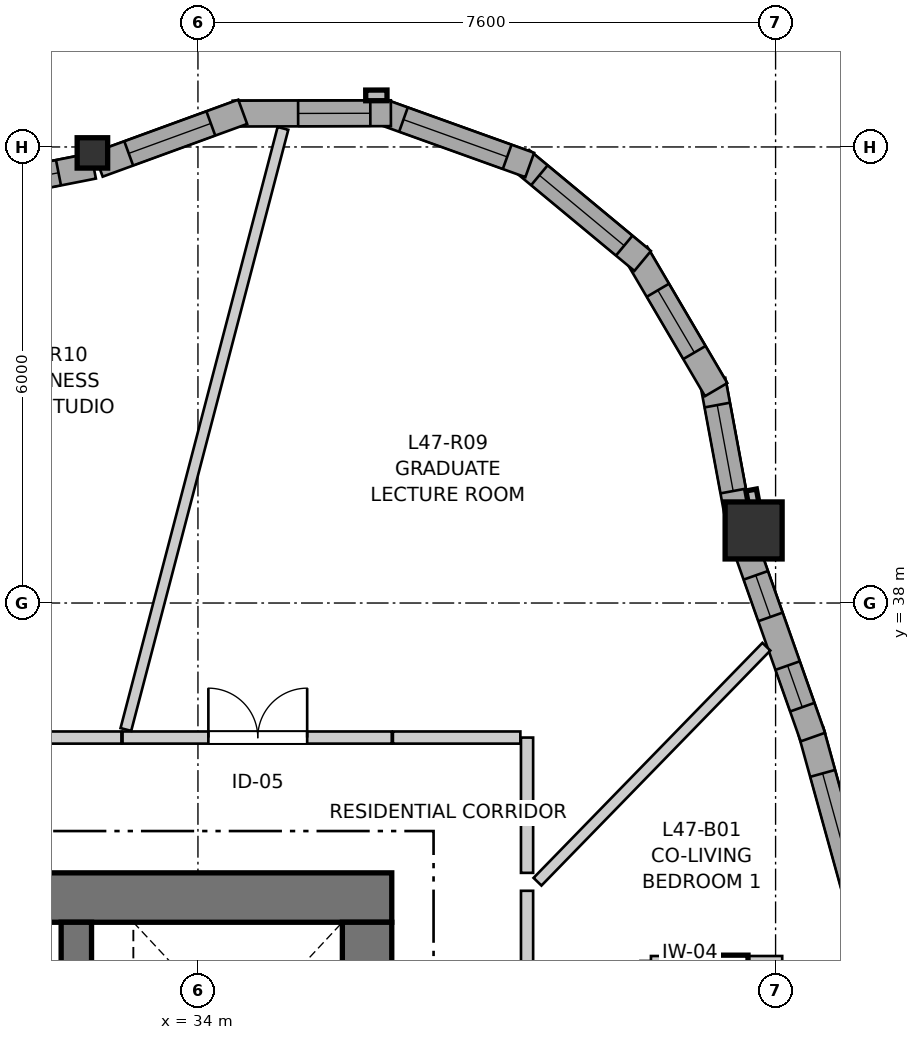
"""IFC4 building model, lengths in metres.
Left out: names, types, materials, properties, quantities, classifications, styles, units other than length and angle.
Written with IfcOpenShell. Run it as: python <this file> out.ifc"""

import sys

from ifc_helpers import new_model, si_unit, direction, frame, frame_2d, origin, origin_2d, place, context, subcontext, project, spatial, rectangle, i_section, extrude, source, transform, mapped, element, fill, save


model = new_model("IFC4")
c1 = context("Model", 3, precision=1e-05, world=origin(), true_north=direction((0.0, 1.0)))
c2 = subcontext(c1, "Body", "Model", "MODEL_VIEW")
j1 = project(units=[si_unit("LENGTHUNIT", "METRE"), si_unit("PLANEANGLEUNIT", "RADIAN")], contexts=[c1])
p1 = place(None, origin())
s1 = spatial("IfcSite", under=j1, at=p1, CompositionType="ELEMENT")
p2 = place(p1, origin())
s2 = spatial("IfcBuilding", under=s1, at=p2, CompositionType="ELEMENT")
p3 = place(p2, frame((0.0, 0.0, 158.6)))
s3 = spatial("IfcBuildingStorey", under=s2, at=p3, CompositionType="ELEMENT", Elevation=158.6)
p4 = place(p3, frame((36.55, 34.125, 0.0), z_axis=(0.0, 0.0, 1.0), x_axis=(-1.0, 0.0, 0.0)))
e1 = element("IfcWall", 1, at=p4, inside=s3, PredefinedType="SHEAR", context=c2, shape_type="SweptSolid", body=[
    extrude(rectangle(XDim=12.4, YDim=0.65, at=frame_2d((6.2, 0.0))), origin(), (0.0, 0.0, 1.0), 2.95),
])
p5 = place(p3, frame((36.225, 18.2, 0.0), z_axis=(0.0, 0.0, 1.0), x_axis=(0.0, 1.0, 0.0)))
e2 = element("IfcWall", 2, at=p5, inside=s3, PredefinedType="SHEAR", context=c2, shape_type="SweptSolid", body=[
    extrude(rectangle(XDim=15.6, YDim=0.65, at=frame_2d((7.8, 0.0))), origin(), (0.0, 0.0, 1.0), 2.95),
])
p6 = place(p5, frame((4.25, 0.0, 0.0)))
e3 = element("IfcOpeningElement", 3, at=p6, cuts=e2, PredefinedType="OPENING", context=c2, shape_type="SweptSolid", body=[
    extrude(rectangle(XDim=1.1, YDim=2.15, at=frame_2d((0.55, 1.075))), frame((0.0, 0.335, 0.0), z_axis=(0.0, -1.0, 0.0), x_axis=(1.0, 0.0, 0.0)), (0.0, 0.0, 1.0), 0.67),
])
p7 = place(p5, frame((10.25, 0.0, 0.0)))
e4 = element("IfcOpeningElement", 4, at=p7, cuts=e2, PredefinedType="OPENING", context=c2, shape_type="SweptSolid", body=[
    extrude(rectangle(XDim=1.1, YDim=2.15, at=frame_2d((0.55, 1.075))), frame((0.0, 0.335, 0.0), z_axis=(0.0, -1.0, 0.0), x_axis=(1.0, 0.0, 0.0)), (0.0, 0.0, 1.0), 0.67),
])
p8 = place(p3, frame((32.4, 30.85, 0.0), z_axis=(0.0, 0.0, 1.0), x_axis=(0.0, 1.0, 0.0)))
e5 = element("IfcWall", 5, at=p8, inside=s3, PredefinedType="SHEAR", context=c2, shape_type="SweptSolid", body=[
    extrude(rectangle(XDim=2.95, YDim=0.4, at=frame_2d((1.475, 0.0))), origin(), (0.0, 0.0, 1.0), 2.95),
])
m1 = source(origin(), c2, "Body", "SweptSolid", [
    extrude(rectangle(XDim=0.75, YDim=0.75, at=origin_2d()), origin(), (0.0, 0.0, 1.0), 2.95),
])
p9 = place(p3, frame((41.311, 38.955, 0.0), z_axis=(0.0, 0.0, 1.0), x_axis=(1.0, 0.0, 0.0)))
e6 = element("IfcColumn", 6, at=p9, inside=s3, PredefinedType="COLUMN", context=c2, shape_type="MappedRepresentation", body=[
    mapped(m1, transform((0.0, 0.0, 0.0), x_axis=(1.0, 0.0, 0.0), y_axis=(0.0, 1.0, 0.0), z_axis=(0.0, 0.0, 1.0), scale=1.0)),
])
m2 = source(origin(), c2, "Body", "SweptSolid", [
    extrude(i_section(OverallWidth=0.401, OverallDepth=0.399, WebThickness=0.023, FlangeThickness=0.036, FilletRadius=0.015, at=origin_2d()), origin(), (0.0, 0.0, 1.0), 2.95),
])
p10 = place(p3, frame((32.611, 43.922, 0.0), z_axis=(0.0, 0.0, 1.0), x_axis=(1.0, 0.0, 0.0)))
e7 = element("IfcColumn", 7, at=p10, inside=s3, PredefinedType="PILASTER", context=c2, shape_type="MappedRepresentation", body=[
    mapped(m2, transform((0.0, 0.0, 0.0), x_axis=(1.0, 0.0, 0.0), y_axis=(0.0, 1.0, 0.0), z_axis=(0.0, 0.0, 1.0), scale=1.0)),
])
p11 = place(p3, frame((42.795, 33.674, 0.0), z_axis=(0.0, 0.0, 1.0), x_axis=(-0.266404970566, 0.963861188999, 0.0)))
e8 = element("IfcWall", 8, at=p11, inside=s3, PredefinedType="SOLIDWALL", context=c2, shape_type="SweptSolid", body=[
    extrude(rectangle(XDim=2.745, YDim=0.34, at=frame_2d((1.372, 0.0))), origin(), (0.0, 0.0, 1.0), 2.53),
])
p12 = place(p11, frame((0.562, 0.0, 0.82)))
e9 = element("IfcOpeningElement", 9, at=p12, cuts=e8, PredefinedType="OPENING", context=c2, shape_type="SweptSolid", body=[
    extrude(rectangle(XDim=1.6, YDim=1.35, at=frame_2d((0.8, 0.675))), frame((0.0, 0.18, 0.0), z_axis=(0.0, -1.0, 0.0), x_axis=(1.0, 0.0, 0.0)), (0.0, 0.0, 1.0), 0.36),
])
p13 = place(p3, frame((42.09, 36.236, 0.0), z_axis=(0.0, 0.0, 1.0), x_axis=(-0.332705243691, 0.943030869495, 0.0)))
e10 = element("IfcWall", 10, at=p13, inside=s3, PredefinedType="SOLIDWALL", context=c2, shape_type="SweptSolid", body=[
    extrude(rectangle(XDim=2.668, YDim=0.34, at=frame_2d((1.334, 0.0))), origin(), (0.0, 0.0, 1.0), 2.53),
])
p14 = place(p13, frame((0.417, 0.0, 0.82)))
e11 = element("IfcOpeningElement", 11, at=p14, cuts=e10, PredefinedType="OPENING", context=c2, shape_type="SweptSolid", body=[
    extrude(rectangle(XDim=0.58, YDim=1.35, at=frame_2d((0.29, 0.675))), frame((0.0, 0.18, 0.0), z_axis=(0.0, -1.0, 0.0), x_axis=(1.0, 0.0, 0.0)), (0.0, 0.0, 1.0), 0.36),
])
p15 = place(p13, frame((1.677, 0.0, 0.82)))
e12 = element("IfcOpeningElement", 12, at=p15, cuts=e10, PredefinedType="OPENING", context=c2, shape_type="SweptSolid", body=[
    extrude(rectangle(XDim=0.58, YDim=1.35, at=frame_2d((0.29, 0.675))), frame((0.0, 0.18, 0.0), z_axis=(0.0, -1.0, 0.0), x_axis=(1.0, 0.0, 0.0)), (0.0, 0.0, 1.0), 0.36),
])
p16 = place(p3, frame((41.115, 39.076, 0.0), z_axis=(0.0, 0.0, 1.0), x_axis=(-0.182320770307, 0.983239104549, 0.0)))
e13 = element("IfcWall", 13, at=p16, inside=s3, PredefinedType="SOLIDWALL", context=c2, shape_type="SweptSolid", body=[
    extrude(rectangle(XDim=1.888, YDim=0.34, at=frame_2d((0.944, 0.0))), origin(), (0.0, 0.0, 1.0), 2.53),
])
p17 = place(p16, frame((0.404, 0.0, 0.82)))
e14 = element("IfcOpeningElement", 14, at=p17, cuts=e13, PredefinedType="OPENING", context=c2, shape_type="SweptSolid", body=[
    extrude(rectangle(XDim=1.15, YDim=1.2, at=frame_2d((0.575, 0.6))), frame((0.0, 0.18, 0.0), z_axis=(0.0, -1.0, 0.0), x_axis=(1.0, 0.0, 0.0)), (0.0, 0.0, 1.0), 0.36),
])
p18 = place(p3, frame((40.818, 40.808, 0.0), z_axis=(0.0, 0.0, 1.0), x_axis=(-0.506312473438, 0.86235009088, 0.0)))
e15 = element("IfcWall", 15, at=p18, inside=s3, PredefinedType="SOLIDWALL", context=c2, shape_type="SweptSolid", body=[
    extrude(rectangle(XDim=2.081, YDim=0.34, at=frame_2d((1.041, 0.0))), origin(), (0.0, 0.0, 1.0), 2.53),
])
p19 = place(p18, frame((0.566, 0.0, 0.82)))
e16 = element("IfcOpeningElement", 16, at=p19, cuts=e15, PredefinedType="OPENING", context=c2, shape_type="SweptSolid", body=[
    extrude(rectangle(XDim=0.95, YDim=1.35, at=frame_2d((0.475, 0.675))), frame((0.0, 0.18, 0.0), z_axis=(0.0, -1.0, 0.0), x_axis=(1.0, 0.0, 0.0)), (0.0, 0.0, 1.0), 0.36),
])
p20 = place(p3, frame((39.851, 42.5, 0.0), z_axis=(0.0, 0.0, 1.0), x_axis=(-0.769642650648, 0.638474894028, 0.0)))
e17 = element("IfcWall", 17, at=p20, inside=s3, PredefinedType="SOLIDWALL", context=c2, shape_type="SweptSolid", body=[
    extrude(rectangle(XDim=2.081, YDim=0.34, at=frame_2d((1.041, 0.0))), origin(), (0.0, 0.0, 1.0), 2.53),
])
p21 = place(p20, frame((0.315, 0.0, 0.82)))
e18 = element("IfcOpeningElement", 18, at=p21, cuts=e17, PredefinedType="OPENING", context=c2, shape_type="SweptSolid", body=[
    extrude(rectangle(XDim=1.45, YDim=1.25, at=frame_2d((0.725, 0.625))), frame((0.0, 0.18, 0.0), z_axis=(0.0, -1.0, 0.0), x_axis=(1.0, 0.0, 0.0)), (0.0, 0.0, 1.0), 0.36),
])
p22 = place(p3, frame((38.365, 43.763, 0.0), z_axis=(0.0, 0.0, 1.0), x_axis=(-0.941071215914, 0.338208466153, 0.0)))
e19 = element("IfcWall", 19, at=p22, inside=s3, PredefinedType="SOLIDWALL", context=c2, shape_type="SweptSolid", body=[
    extrude(rectangle(XDim=2.081, YDim=0.34, at=frame_2d((1.041, 0.0))), origin(), (0.0, 0.0, 1.0), 2.53),
])
p23 = place(p22, frame((0.316, 0.0, 0.82)))
e20 = element("IfcOpeningElement", 20, at=p23, cuts=e19, PredefinedType="OPENING", context=c2, shape_type="SweptSolid", body=[
    extrude(rectangle(XDim=1.45, YDim=1.25, at=frame_2d((0.725, 0.625))), frame((0.0, 0.18, 0.0), z_axis=(0.0, -1.0, 0.0), x_axis=(1.0, 0.0, 0.0)), (0.0, 0.0, 1.0), 0.36),
])
p24 = place(p3, frame((36.538, 44.444, 0.0), z_axis=(0.0, 0.0, 1.0), x_axis=(-0.999997247411, -0.002346309825, 0.0)))
e21 = element("IfcWall", 21, at=p24, inside=s3, PredefinedType="SOLIDWALL", context=c2, shape_type="SweptSolid", body=[
    extrude(rectangle(XDim=2.081, YDim=0.34, at=frame_2d((1.041, 0.0))), origin(), (0.0, 0.0, 1.0), 2.53),
])
p25 = place(p24, frame((0.271, 0.0, 0.82)))
e22 = element("IfcOpeningElement", 22, at=p25, cuts=e21, PredefinedType="OPENING", context=c2, shape_type="SweptSolid", body=[
    extrude(rectangle(XDim=0.95, YDim=1.35, at=frame_2d((0.475, 0.675))), frame((0.0, 0.18, 0.0), z_axis=(0.0, -1.0, 0.0), x_axis=(1.0, 0.0, 0.0)), (0.0, 0.0, 1.0), 0.36),
])
p26 = place(p3, frame((34.589, 44.462, 0.0), z_axis=(0.0, 0.0, 1.0), x_axis=(-0.939387553708, -0.342857148007, 0.0)))
e23 = element("IfcWall", 23, at=p26, inside=s3, PredefinedType="SOLIDWALL", context=c2, shape_type="SweptSolid", body=[
    extrude(rectangle(XDim=2.023, YDim=0.34, at=frame_2d((1.011, 0.0))), origin(), (0.0, 0.0, 1.0), 2.53),
])
p27 = place(p26, frame((0.447, 0.0, 0.82)))
e24 = element("IfcOpeningElement", 24, at=p27, cuts=e23, PredefinedType="OPENING", context=c2, shape_type="SweptSolid", body=[
    extrude(rectangle(XDim=1.15, YDim=1.2, at=frame_2d((0.575, 0.6))), frame((0.0, 0.18, 0.0), z_axis=(0.0, -1.0, 0.0), x_axis=(1.0, 0.0, 0.0)), (0.0, 0.0, 1.0), 0.36),
])
p28 = place(p3, frame((32.625, 43.751, 0.0), z_axis=(0.0, 0.0, 1.0), x_axis=(-0.981232663103, -0.192827541756, 0.0)))
e25 = element("IfcWall", 25, at=p28, inside=s3, PredefinedType="SOLIDWALL", context=c2, shape_type="SweptSolid", body=[
    extrude(rectangle(XDim=2.756, YDim=0.34, at=frame_2d((1.378, 0.0))), origin(), (0.0, 0.0, 1.0), 2.53),
])
p29 = place(p28, frame((0.468, 0.0, 0.82)))
e26 = element("IfcOpeningElement", 26, at=p29, cuts=e25, PredefinedType="OPENING", context=c2, shape_type="SweptSolid", body=[
    extrude(rectangle(XDim=1.8, YDim=1.45, at=frame_2d((0.9, 0.725))), frame((0.0, 0.18, 0.0), z_axis=(0.0, -1.0, 0.0), x_axis=(1.0, 0.0, 0.0)), (0.0, 0.0, 1.0), 0.36),
])
p30 = place(p3, frame((38.33, 34.214, 0.0), z_axis=(0.0, 0.0, 1.0), x_axis=(0.0, -1.0, 0.0)))
e27 = element("IfcWall", 27, at=p30, inside=s3, PredefinedType="PARTITIONING", context=c2, shape_type="SweptSolid", body=[
    extrude(rectangle(XDim=4.093, YDim=0.16, at=frame_2d((2.046, 0.0))), origin(), (0.0, 0.0, 1.0), 2.95),
])
p31 = place(p30, frame((1.589, 0.0, 0.0)))
e28 = element("IfcOpeningElement", 28, at=p31, cuts=e27, PredefinedType="OPENING", context=c2, shape_type="SweptSolid", body=[
    extrude(rectangle(XDim=0.92, YDim=2.1, at=frame_2d((0.46, 1.05))), frame((0.0, 0.09, 0.0), z_axis=(0.0, -1.0, 0.0), x_axis=(1.0, 0.0, 0.0)), (0.0, 0.0, 1.0), 0.18),
])
p32 = place(p3, frame((33.008, 36.23, 0.0), z_axis=(0.0, 0.0, 1.0), x_axis=(1.0, 0.0, 0.0)))
e29 = element("IfcWall", 29, at=p32, inside=s3, PredefinedType="PARTITIONING", context=c2, shape_type="SweptSolid", body=[
    extrude(rectangle(XDim=3.542, YDim=0.16, at=frame_2d((1.771, 0.0))), origin(), (0.0, 0.0, 1.0), 2.588),
])
p33 = place(p32, frame((1.129, 0.0, 0.0)))
e30 = element("IfcOpeningElement", 30, at=p33, cuts=e29, PredefinedType="OPENING", context=c2, shape_type="SweptSolid", body=[
    extrude(rectangle(XDim=1.3, YDim=2.1, at=frame_2d((0.65, 1.05))), frame((0.0, 0.09, 0.0), z_axis=(0.0, -1.0, 0.0), x_axis=(1.0, 0.0, 0.0)), (0.0, 0.0, 1.0), 0.18),
])
p34 = place(p3, frame((30.055, 36.23, 0.0), z_axis=(0.0, 0.0, 1.0), x_axis=(1.0, 0.0, 0.0)))
e31 = element("IfcWall", 31, at=p34, inside=s3, PredefinedType="PARTITIONING", context=c2, shape_type="SweptSolid", body=[
    extrude(rectangle(XDim=2.938, YDim=0.16, at=frame_2d((1.469, 0.0))), origin(), (0.0, 0.0, 1.0), 2.588),
])
p35 = place(p34, frame((0.99, 0.0, 0.0)))
e32 = element("IfcOpeningElement", 32, at=p35, cuts=e31, PredefinedType="OPENING", context=c2, shape_type="SweptSolid", body=[
    extrude(rectangle(XDim=0.96, YDim=2.1, at=frame_2d((0.48, 1.05))), frame((0.0, 0.09, 0.0), z_axis=(0.0, -1.0, 0.0), x_axis=(1.0, 0.0, 0.0)), (0.0, 0.0, 1.0), 0.18),
])
p36 = place(p3, frame((39.887, 33.291, 0.0), z_axis=(0.0, 0.0, 1.0), x_axis=(0.0, -1.0, 0.0)))
e33 = element("IfcWall", 33, at=p36, inside=s3, PredefinedType="PARTITIONING", context=c2, shape_type="SweptSolid", body=[
    extrude(rectangle(XDim=1.9, YDim=0.13, at=frame_2d((0.95, 0.0))), origin(), (0.0, 0.0, 1.0), 2.95),
])
p37 = place(p36, frame((0.51, 0.0, 0.0)))
e34 = element("IfcOpeningElement", 34, at=p37, cuts=e33, PredefinedType="OPENING", context=c2, shape_type="SweptSolid", body=[
    extrude(rectangle(XDim=0.88, YDim=2.05, at=frame_2d((0.44, 1.025))), frame((0.0, 0.075, 0.0), z_axis=(0.0, -1.0, 0.0), x_axis=(1.0, 0.0, 0.0)), (0.0, 0.0, 1.0), 0.15),
])
p38 = place(p3, frame((33.052, 36.336, 0.0), z_axis=(0.0, 0.0, 1.0), x_axis=(0.252838925964, 0.967508386277, 0.0)))
e35 = element("IfcWall", 35, at=p38, inside=s3, PredefinedType="PARTITIONING", context=c2, shape_type="SweptSolid", body=[
    extrude(rectangle(XDim=8.174, YDim=0.145, at=frame_2d((4.087, 0.0))), origin(), (0.0, 0.0, 1.0), 2.95),
])
p39 = place(p3, frame((38.468, 34.333, 0.0), z_axis=(0.0, 0.0, 1.0), x_axis=(0.697683159601, 0.71640645503, 0.0)))
e36 = element("IfcWall", 36, at=p39, inside=s3, PredefinedType="PARTITIONING", context=c2, shape_type="SweptSolid", body=[
    extrude(rectangle(XDim=4.316, YDim=0.145, at=frame_2d((2.158, 0.0))), origin(), (0.0, 0.0, 1.0), 2.95),
])
p40 = place(p3, frame((39.96, 33.291, 0.0), z_axis=(0.0, 0.0, 1.0), x_axis=(1.0, 0.0, 0.0)))
e37 = element("IfcWall", 37, at=p40, inside=s3, PredefinedType="PARTITIONING", context=c2, shape_type="SweptSolid", body=[
    extrude(rectangle(XDim=1.727, YDim=0.13, at=frame_2d((0.864, 0.0))), origin(), (0.0, 0.0, 1.0), 2.95),
])
p41 = place(p3, frame((38.33, 34.45, 0.0), z_axis=(0.0, 0.0, 1.0), x_axis=(0.0, 1.0, 0.0)))
e38 = element("IfcWall", 38, at=p41, inside=s3, PredefinedType="PARTITIONING", context=c2, shape_type="SweptSolid", body=[
    extrude(rectangle(XDim=1.78, YDim=0.16, at=frame_2d((0.89, 0.0))), origin(), (0.0, 0.0, 1.0), 2.95),
])
p42 = place(p3, frame((36.565, 36.23, 0.0), z_axis=(0.0, 0.0, 1.0), x_axis=(1.0, 0.0, 0.0)))
e39 = element("IfcWall", 39, at=p42, inside=s3, PredefinedType="PARTITIONING", context=c2, shape_type="SweptSolid", body=[
    extrude(rectangle(XDim=1.677, YDim=0.16, at=frame_2d((0.838, 0.0))), origin(), (0.0, 0.0, 1.0), 2.95),
])
m3 = source(origin(), c2, "Body", "SweptSolid", [
    extrude(rectangle(XDim=1.6, YDim=1.35, at=frame_2d((0.8, 0.675))), frame((0.0, 0.03, 0.0), z_axis=(0.0, -1.0, 0.0), x_axis=(1.0, 0.0, 0.0)), (0.0, 0.0, 1.0), 0.06),
])
p43 = place(p12, origin())
e40 = element("IfcWindow", 40, at=p43, inside=s3, PartitioningType="SINGLE_PANEL", PredefinedType="WINDOW", context=c2, shape_type="MappedRepresentation", body=[
    mapped(m3, transform((0.0, 0.0, 0.0), x_axis=(1.0, 0.0, 0.0), y_axis=(0.0, 1.0, 0.0), z_axis=(0.0, 0.0, 1.0), scale=1.0)),
])
fill(e9, e40)
m4 = source(origin(), c2, "Body", "SweptSolid", [
    extrude(rectangle(XDim=0.58, YDim=1.35, at=frame_2d((0.29, 0.675))), frame((0.0, 0.03, 0.0), z_axis=(0.0, -1.0, 0.0), x_axis=(1.0, 0.0, 0.0)), (0.0, 0.0, 1.0), 0.06),
])
p44 = place(p14, origin())
e41 = element("IfcWindow", 41, at=p44, inside=s3, PartitioningType="SINGLE_PANEL", PredefinedType="WINDOW", context=c2, shape_type="MappedRepresentation", body=[
    mapped(m4, transform((0.0, 0.0, 0.0), x_axis=(1.0, 0.0, 0.0), y_axis=(0.0, 1.0, 0.0), z_axis=(0.0, 0.0, 1.0), scale=1.0)),
])
fill(e11, e41)
p45 = place(p15, origin())
e42 = element("IfcWindow", 42, at=p45, inside=s3, PartitioningType="SINGLE_PANEL", PredefinedType="WINDOW", context=c2, shape_type="MappedRepresentation", body=[
    mapped(m4, transform((0.0, 0.0, 0.0), x_axis=(1.0, 0.0, 0.0), y_axis=(0.0, 1.0, 0.0), z_axis=(0.0, 0.0, 1.0), scale=1.0)),
])
fill(e12, e42)
m5 = source(origin(), c2, "Body", "SweptSolid", [
    extrude(rectangle(XDim=1.15, YDim=1.2, at=frame_2d((0.575, 0.6))), frame((0.0, 0.03, 0.0), z_axis=(0.0, -1.0, 0.0), x_axis=(1.0, 0.0, 0.0)), (0.0, 0.0, 1.0), 0.06),
])
p46 = place(p17, origin())
e43 = element("IfcWindow", 43, at=p46, inside=s3, PartitioningType="SINGLE_PANEL", PredefinedType="WINDOW", context=c2, shape_type="MappedRepresentation", body=[
    mapped(m5, transform((0.0, 0.0, 0.0), x_axis=(1.0, 0.0, 0.0), y_axis=(0.0, 1.0, 0.0), z_axis=(0.0, 0.0, 1.0), scale=1.0)),
])
fill(e14, e43)
m6 = source(origin(), c2, "Body", "SweptSolid", [
    extrude(rectangle(XDim=0.95, YDim=1.35, at=frame_2d((0.475, 0.675))), frame((0.0, 0.03, 0.0), z_axis=(0.0, -1.0, 0.0), x_axis=(1.0, 0.0, 0.0)), (0.0, 0.0, 1.0), 0.06),
])
p47 = place(p19, origin())
e44 = element("IfcWindow", 44, at=p47, inside=s3, PartitioningType="SINGLE_PANEL", PredefinedType="WINDOW", context=c2, shape_type="MappedRepresentation", body=[
    mapped(m6, transform((0.0, 0.0, 0.0), x_axis=(1.0, 0.0, 0.0), y_axis=(0.0, 1.0, 0.0), z_axis=(0.0, 0.0, 1.0), scale=1.0)),
])
fill(e16, e44)
m7 = source(origin(), c2, "Body", "SweptSolid", [
    extrude(rectangle(XDim=1.45, YDim=1.25, at=frame_2d((0.725, 0.625))), frame((0.0, 0.03, 0.0), z_axis=(0.0, -1.0, 0.0), x_axis=(1.0, 0.0, 0.0)), (0.0, 0.0, 1.0), 0.06),
])
p48 = place(p21, origin())
e45 = element("IfcWindow", 45, at=p48, inside=s3, PartitioningType="SINGLE_PANEL", PredefinedType="WINDOW", context=c2, shape_type="MappedRepresentation", body=[
    mapped(m7, transform((0.0, 0.0, 0.0), x_axis=(1.0, 0.0, 0.0), y_axis=(0.0, 1.0, 0.0), z_axis=(0.0, 0.0, 1.0), scale=1.0)),
])
fill(e18, e45)
p49 = place(p23, origin())
e46 = element("IfcWindow", 46, at=p49, inside=s3, PartitioningType="SINGLE_PANEL", PredefinedType="WINDOW", context=c2, shape_type="MappedRepresentation", body=[
    mapped(m7, transform((0.0, 0.0, 0.0), x_axis=(1.0, 0.0, 0.0), y_axis=(0.0, 1.0, 0.0), z_axis=(0.0, 0.0, 1.0), scale=1.0)),
])
fill(e20, e46)
p50 = place(p25, origin())
e47 = element("IfcWindow", 47, at=p50, inside=s3, PartitioningType="SINGLE_PANEL", PredefinedType="WINDOW", context=c2, shape_type="MappedRepresentation", body=[
    mapped(m6, transform((0.0, 0.0, 0.0), x_axis=(1.0, 0.0, 0.0), y_axis=(0.0, 1.0, 0.0), z_axis=(0.0, 0.0, 1.0), scale=1.0)),
])
fill(e22, e47)
p51 = place(p27, origin())
e48 = element("IfcWindow", 48, at=p51, inside=s3, PartitioningType="SINGLE_PANEL", PredefinedType="WINDOW", context=c2, shape_type="MappedRepresentation", body=[
    mapped(m5, transform((0.0, 0.0, 0.0), x_axis=(1.0, 0.0, 0.0), y_axis=(0.0, 1.0, 0.0), z_axis=(0.0, 0.0, 1.0), scale=1.0)),
])
fill(e24, e48)
m8 = source(origin(), c2, "Body", "SweptSolid", [
    extrude(rectangle(XDim=1.8, YDim=1.45, at=frame_2d((0.9, 0.725))), frame((0.0, 0.03, 0.0), z_axis=(0.0, -1.0, 0.0), x_axis=(1.0, 0.0, 0.0)), (0.0, 0.0, 1.0), 0.06),
])
p52 = place(p29, origin())
e49 = element("IfcWindow", 49, at=p52, inside=s3, PartitioningType="SINGLE_PANEL", PredefinedType="WINDOW", context=c2, shape_type="MappedRepresentation", body=[
    mapped(m8, transform((0.0, 0.0, 0.0), x_axis=(1.0, 0.0, 0.0), y_axis=(0.0, 1.0, 0.0), z_axis=(0.0, 0.0, 1.0), scale=1.0)),
])
fill(e26, e49)
m9 = source(origin(), c2, "Body", "SweptSolid", [
    extrude(rectangle(XDim=1.3, YDim=2.1, at=frame_2d((0.65, 1.05))), frame((0.0, 0.025, 0.0), z_axis=(0.0, -1.0, 0.0), x_axis=(1.0, 0.0, 0.0)), (0.0, 0.0, 1.0), 0.05),
])
p53 = place(p33, origin())
e50 = element("IfcDoor", 50, at=p53, inside=s3, OperationType="DOUBLE_DOOR_SINGLE_SWING", PredefinedType="DOOR", context=c2, shape_type="MappedRepresentation", body=[
    mapped(m9, transform((0.0, 0.0, 0.0), x_axis=(1.0, 0.0, 0.0), y_axis=(0.0, 1.0, 0.0), z_axis=(0.0, 0.0, 1.0), scale=1.0)),
])
fill(e30, e50)
save(model, sys.argv[1])
